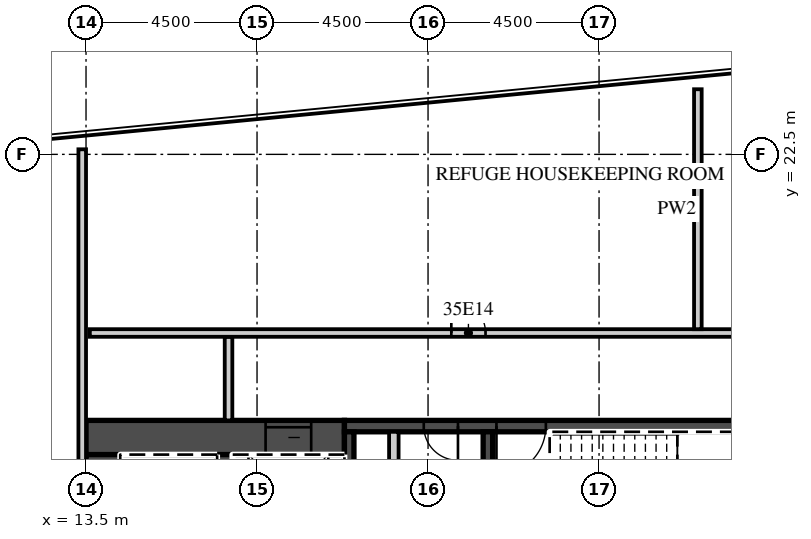
"""IFC4 building model, lengths in metres.
Left out: names, types, materials, properties, quantities, classifications, styles, units other than length and angle.
Written with IfcOpenShell. Run it as: python <this file> out.ifc"""

import sys

from ifc_helpers import new_model, si_unit, direction, frame, frame_2d, origin, place, context, subcontext, project, spatial, rectangle, extrude, element, fill, save


model = new_model("IFC4")
c1 = context("Model", 3, precision=1e-05, world=origin(), true_north=direction((0.0, 1.0)))
c2 = subcontext(c1, "Body", "Model", "MODEL_VIEW")
j1 = project(units=[si_unit("LENGTHUNIT", "METRE"), si_unit("PLANEANGLEUNIT", "RADIAN")], contexts=[c1])
p1 = place(None, origin())
s1 = spatial("IfcSite", under=j1, at=p1, CompositionType="ELEMENT")
p2 = place(p1, origin())
s2 = spatial("IfcBuilding", under=s1, at=p2, CompositionType="ELEMENT")
p3 = place(p2, frame((0.0, 0.0, 150.4)))
s3 = spatial("IfcBuildingStorey", under=s2, at=p3, CompositionType="ELEMENT", Elevation=150.4)
p4 = place(p3, frame((13.5, 15.05, 0.0), z_axis=(0.0, 0.0, 1.0), x_axis=(1.0, 0.0, 0.0)))
e1 = element("IfcWall", 1, at=p4, inside=s3, PredefinedType="SHEAR", context=c2, shape_type="SweptSolid", body=[
    extrude(rectangle(XDim=6.8, YDim=0.9, at=frame_2d((3.4, 0.0))), origin(), (0.0, 0.0, 1.0), 4.2),
])
p5 = place(p4, frame((4.725, 0.0, 0.0)))
e2 = element("IfcOpeningElement", 2, at=p5, cuts=e1, PredefinedType="OPENING", context=c2, shape_type="SweptSolid", body=[
    extrude(rectangle(XDim=1.2, YDim=2.1, at=frame_2d((0.6, 1.05))), frame((0.0, 0.46, 0.0), z_axis=(0.0, -1.0, 0.0), x_axis=(1.0, 0.0, 0.0)), (0.0, 0.0, 1.0), 0.92),
])
p6 = place(p3, frame((20.3, 15.35, 0.0), z_axis=(0.0, 0.0, 1.0), x_axis=(1.0, 0.0, 0.0)))
e3 = element("IfcWall", 3, at=p6, inside=s3, PredefinedType="SHEAR", context=c2, shape_type="SweptSolid", body=[
    extrude(rectangle(XDim=10.3, YDim=0.3, at=frame_2d((5.15, 0.0))), origin(), (0.0, 0.0, 1.0), 4.2),
])
p7 = place(p6, frame((4.0, 0.0, 0.0)))
e4 = element("IfcOpeningElement", 4, at=p7, cuts=e3, PredefinedType="OPENING", context=c2, shape_type="SweptSolid", body=[
    extrude(rectangle(XDim=1.3, YDim=2.1, at=frame_2d((0.65, 1.05))), frame((0.0, 0.16, 0.0), z_axis=(0.0, -1.0, 0.0), x_axis=(1.0, 0.0, 0.0)), (0.0, 0.0, 1.0), 0.32),
])
p8 = place(p6, frame((2.087, 0.0, 0.0)))
e5 = element("IfcOpeningElement", 5, at=p8, cuts=e3, PredefinedType="OPENING", context=c2, shape_type="SweptSolid", body=[
    extrude(rectangle(XDim=0.9, YDim=2.1, at=frame_2d((0.45, 1.05))), frame((0.0, 0.16, 0.0), z_axis=(0.0, -1.0, 0.0), x_axis=(1.0, 0.0, 0.0)), (0.0, 0.0, 1.0), 0.32),
])
p9 = place(p3, frame((13.95, 2.4, 0.0), z_axis=(0.0, 0.0, 1.0), x_axis=(0.0, 1.0, 0.0)))
e6 = element("IfcWall", 6, at=p9, inside=s3, PredefinedType="SHEAR", context=c2, shape_type="SweptSolid", body=[
    extrude(rectangle(XDim=12.2, YDim=0.9, at=frame_2d((6.1, 0.0))), origin(), (0.0, 0.0, 1.0), 4.2),
])
p10 = place(p3, frame((17.15, 8.8, 0.0), z_axis=(0.0, 0.0, 1.0), x_axis=(0.0, 1.0, 0.0)))
e7 = element("IfcWall", 7, at=p10, inside=s3, PredefinedType="SHEAR", context=c2, shape_type="SweptSolid", body=[
    extrude(rectangle(XDim=5.8, YDim=0.4, at=frame_2d((2.9, 0.0))), origin(), (0.0, 0.0, 1.0), 4.2),
])
for number, where, z_axis, x_axis in (
    (8, (20.425, 11.95, 0.0), (0.0, 0.0, 1.0), (0.0, 1.0, 0.0)),
    (9, (24.075, 11.95, 0.0), (0.0, 0.0, 1.0), (0.0, 1.0, 0.0)),
):
    element("IfcWall", number, at=place(p3, frame(where, z_axis=z_axis, x_axis=x_axis)), inside=s3, PredefinedType="SHEAR", context=c2, shape_type="SweptSolid", body=[
        extrude(rectangle(XDim=3.25, YDim=0.25, at=frame_2d((1.625, 0.0))), origin(), (0.0, 0.0, 1.0), 4.2),
    ])
p11 = place(p3, frame((21.6, 11.95, 0.0), z_axis=(0.0, 0.0, 1.0), x_axis=(0.0, 1.0, 0.0)))
e10 = element("IfcWall", 10, at=p11, inside=s3, PredefinedType="PARTITIONING", context=c2, shape_type="SweptSolid", body=[
    extrude(rectangle(XDim=3.25, YDim=0.25, at=frame_2d((1.625, 0.0))), origin(), (0.0, 0.0, 1.0), 4.2),
])
p12 = place(p3, frame((17.25, 15.5, 0.0), z_axis=(0.0, 0.0, 1.0), x_axis=(0.0, 1.0, 0.0)))
e11 = element("IfcWall", 11, at=p12, inside=s3, PredefinedType="PARTITIONING", context=c2, shape_type="SweptSolid", body=[
    extrude(rectangle(XDim=2.2, YDim=0.2, at=frame_2d((1.1, 0.0))), origin(), (0.0, 0.0, 1.0), 4.2),
])
p13 = place(p3, frame((13.6, 17.8, 0.0), z_axis=(0.0, 0.0, 1.0), x_axis=(1.0, 0.0, 0.0)))
e12 = element("IfcWall", 12, at=p13, inside=s3, PredefinedType="PARTITIONING", context=c2, shape_type="SweptSolid", body=[
    extrude(rectangle(XDim=31.993, YDim=0.2, at=frame_2d((15.997, 0.0))), origin(), (0.0, 0.0, 1.0), 4.2),
])
p14 = place(p13, frame((17.812, 0.0, 0.0)))
e13 = element("IfcOpeningElement", 13, at=p14, cuts=e12, PredefinedType="OPENING", context=c2, shape_type="SweptSolid", body=[
    extrude(rectangle(XDim=0.9, YDim=2.1, at=frame_2d((0.45, 1.05))), frame((0.0, 0.11, 0.0), z_axis=(0.0, -1.0, 0.0), x_axis=(1.0, 0.0, 0.0)), (0.0, 0.0, 1.0), 0.22),
])
p15 = place(p13, frame((9.512, 0.0, 0.0)))
e14 = element("IfcOpeningElement", 14, at=p15, cuts=e12, PredefinedType="OPENING", context=c2, shape_type="SweptSolid", body=[
    extrude(rectangle(XDim=0.9, YDim=2.1, at=frame_2d((0.45, 1.05))), frame((0.0, 0.11, 0.0), z_axis=(0.0, -1.0, 0.0), x_axis=(1.0, 0.0, 0.0)), (0.0, 0.0, 1.0), 0.22),
])
p16 = place(p3, frame((29.6, 17.9, 0.0), z_axis=(0.0, 0.0, 1.0), x_axis=(0.0, 1.0, 0.0)))
e15 = element("IfcWall", 15, at=p16, inside=s3, PredefinedType="PARTITIONING", context=c2, shape_type="SweptSolid", body=[
    extrude(rectangle(XDim=6.313, YDim=0.2, at=frame_2d((3.157, 0.0))), origin(), (0.0, 0.0, 1.0), 4.2),
])
p17 = place(p3, frame((13.4, 1.7, 0.0), z_axis=(0.0, 0.0, 1.0), x_axis=(0.0, 1.0, 0.0)))
e16 = element("IfcWall", 16, at=p17, inside=s3, PredefinedType="PARTITIONING", context=c2, shape_type="SweptSolid", body=[
    extrude(rectangle(XDim=20.933, YDim=0.2, at=frame_2d((10.467, 0.0))), origin(), (0.0, 0.0, 1.0), 4.2),
])
p18 = place(p5, origin())
e17 = element("IfcDoor", 17, at=p18, inside=s3, OperationType="SLIDING_TO_LEFT", PredefinedType="DOOR", context=c2, shape_type="SweptSolid", body=[
    extrude(rectangle(XDim=1.2, YDim=2.1, at=frame_2d((0.6, 1.05))), frame((0.0, 0.025, 0.0), z_axis=(0.0, -1.0, 0.0), x_axis=(1.0, 0.0, 0.0)), (0.0, 0.0, 1.0), 0.05),
])
fill(e2, e17)
p19 = place(p7, origin())
e18 = element("IfcDoor", 18, at=p19, inside=s3, OperationType="SINGLE_SWING_LEFT", PredefinedType="DOOR", context=c2, shape_type="SweptSolid", body=[
    extrude(rectangle(XDim=1.3, YDim=2.1, at=frame_2d((0.65, 1.05))), frame((0.0, 0.025, 0.0), z_axis=(0.0, -1.0, 0.0), x_axis=(1.0, 0.0, 0.0)), (0.0, 0.0, 1.0), 0.05),
])
fill(e4, e18)
p20 = place(p8, origin())
e19 = element("IfcDoor", 19, at=p20, inside=s3, OperationType="SINGLE_SWING_RIGHT", PredefinedType="DOOR", context=c2, shape_type="SweptSolid", body=[
    extrude(rectangle(XDim=0.9, YDim=2.1, at=frame_2d((0.45, 1.05))), frame((0.0, 0.025, 0.0), z_axis=(0.0, -1.0, 0.0), x_axis=(1.0, 0.0, 0.0)), (0.0, 0.0, 1.0), 0.05),
])
fill(e5, e19)
p21 = place(p15, origin())
e20 = element("IfcDoor", 20, at=p21, inside=s3, OperationType="SINGLE_SWING_LEFT", PredefinedType="DOOR", context=c2, shape_type="SweptSolid", body=[
    extrude(rectangle(XDim=0.9, YDim=2.1, at=frame_2d((0.45, 1.05))), frame((0.0, 0.025, 0.0), z_axis=(0.0, -1.0, 0.0), x_axis=(1.0, 0.0, 0.0)), (0.0, 0.0, 1.0), 0.05),
])
fill(e14, e20)
save(model, sys.argv[1])
